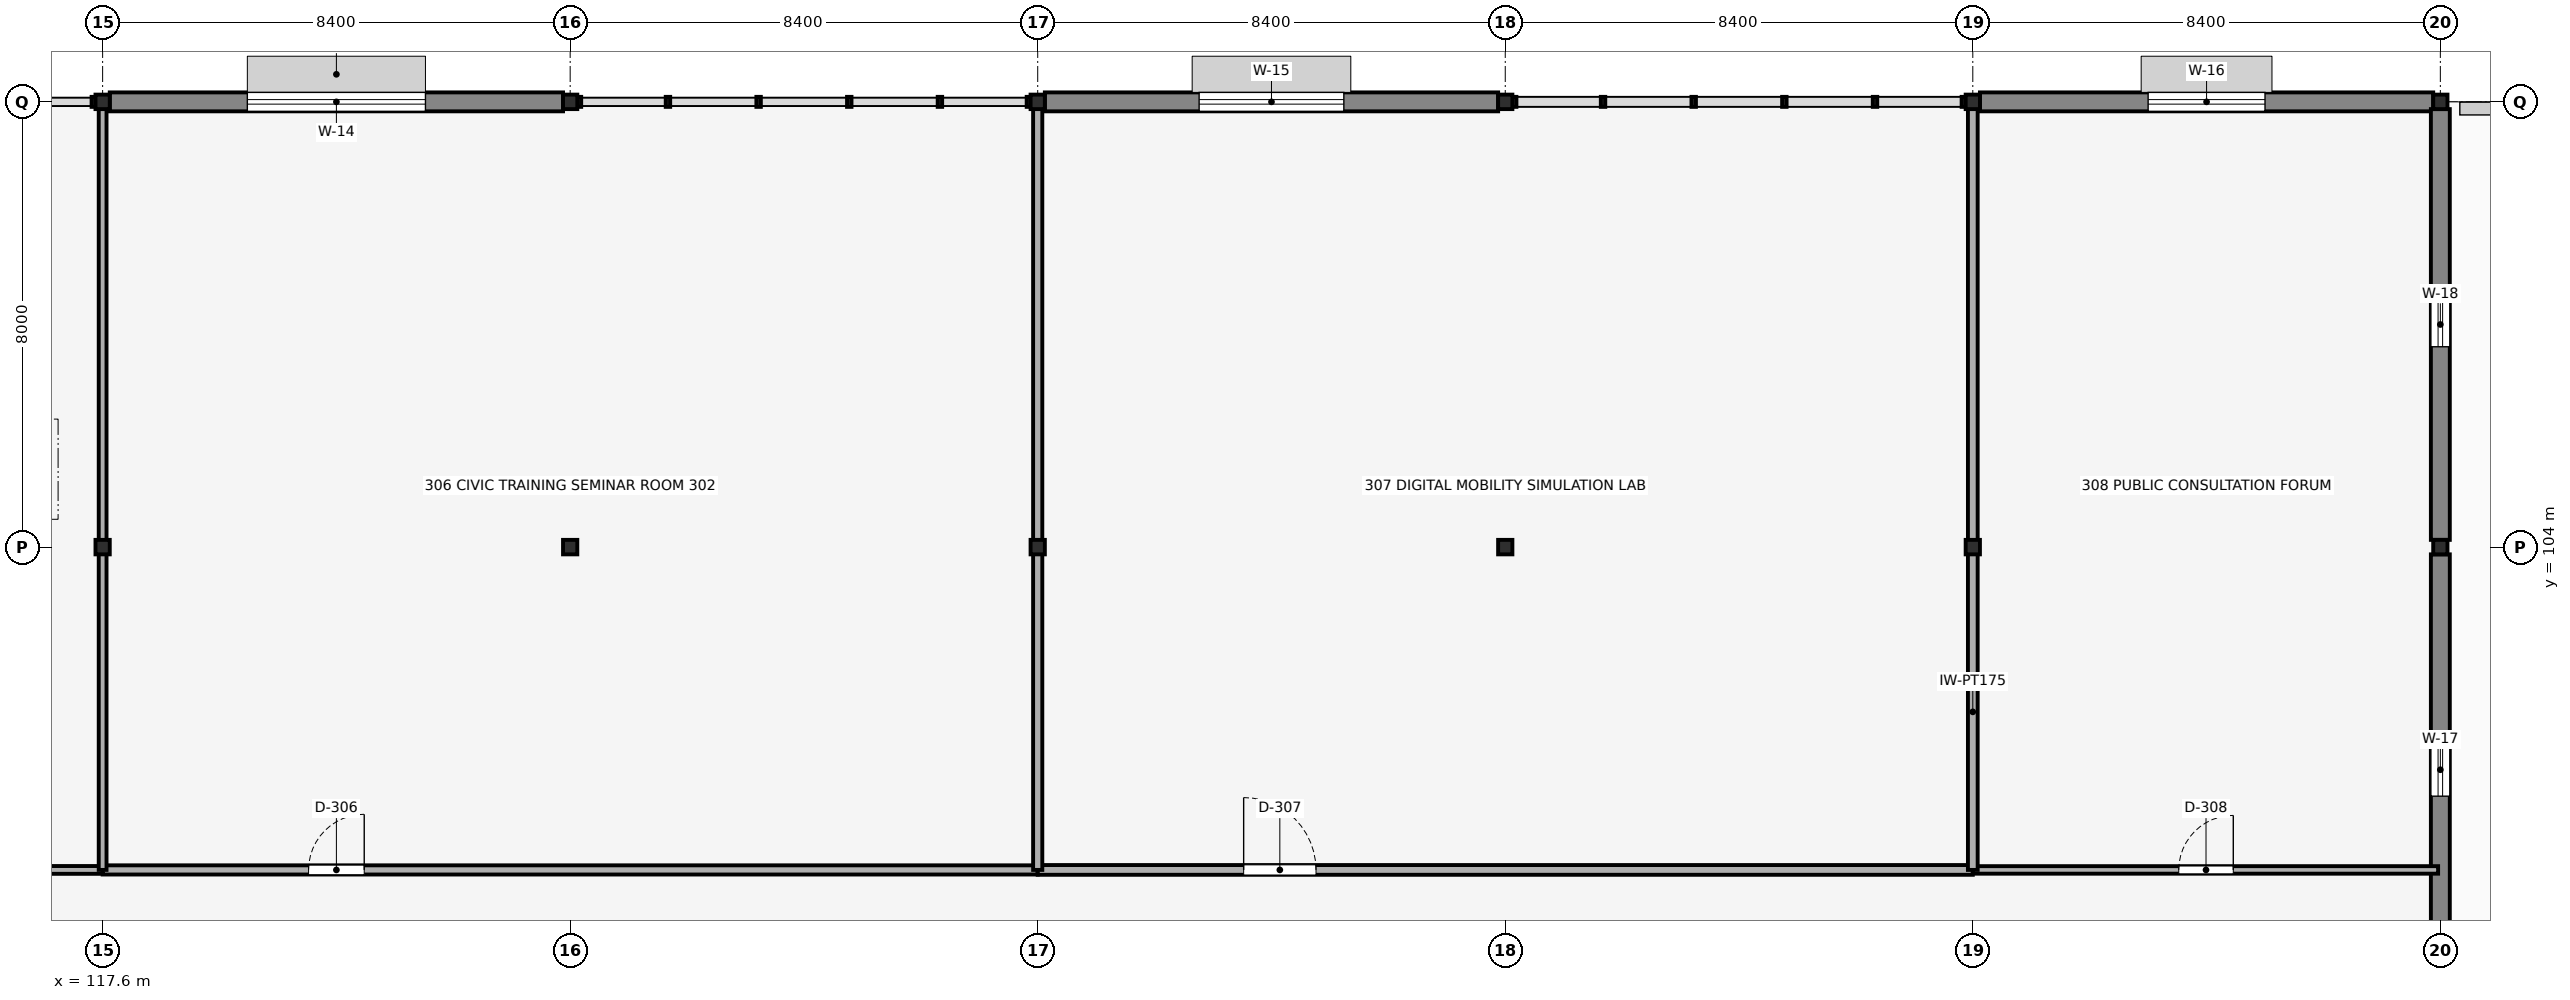
"""IFC4 building model, lengths in metres.
Left out: names, types, materials, properties, quantities, classifications, styles, units other than length and angle.
Written with IfcOpenShell. Run it as: python <this file> out.ifc"""

import sys

from ifc_helpers import new_model, si_unit, direction, frame, frame_2d, origin, origin_2d, place, context, subcontext, project, spatial, rectangle, i_section, extrude, element, fill, save


model = new_model("IFC4")
c1 = context("Model", 3, precision=1e-05, world=origin(), true_north=direction((0.0, 1.0)))
c2 = subcontext(c1, "Body", "Model", "MODEL_VIEW")
j1 = project(units=[si_unit("LENGTHUNIT", "METRE"), si_unit("PLANEANGLEUNIT", "RADIAN")], contexts=[c1])
p1 = place(None, origin())
s1 = spatial("IfcSite", under=j1, at=p1, CompositionType="ELEMENT")
p2 = place(p1, origin())
s2 = spatial("IfcBuilding", under=s1, at=p2, CompositionType="ELEMENT")
p3 = place(p2, frame((0.0, 0.0, 13.36)))
s3 = spatial("IfcBuildingStorey", under=s2, at=p3, CompositionType="ELEMENT", Elevation=13.36)
for number, where, z_axis, x_axis in (
    (1, (117.6, 104.0, 0.0), (0.0, 0.0, 1.0), (1.0, 0.0, 0.0)),
    (2, (117.6, 112.0, 0.0), (0.0, 0.0, 1.0), (1.0, 0.0, 0.0)),
    (3, (126.0, 104.0, 0.0), (0.0, 0.0, 1.0), (1.0, 0.0, 0.0)),
    (4, (126.0, 112.0, 0.0), (0.0, 0.0, 1.0), (1.0, 0.0, 0.0)),
    (5, (134.4, 104.0, 0.0), (0.0, 0.0, 1.0), (1.0, 0.0, 0.0)),
    (6, (134.4, 112.0, 0.0), (0.0, 0.0, 1.0), (1.0, 0.0, 0.0)),
    (7, (142.8, 104.0, 0.0), (0.0, 0.0, 1.0), (1.0, 0.0, 0.0)),
    (8, (142.8, 112.0, 0.0), (0.0, 0.0, 1.0), (1.0, 0.0, 0.0)),
    (9, (151.2, 104.0, 0.0), (0.0, 0.0, 1.0), (1.0, 0.0, 0.0)),
    (10, (151.2, 112.0, 0.0), (0.0, 0.0, 1.0), (1.0, 0.0, 0.0)),
    (11, (159.6, 104.0, 0.0), (0.0, 0.0, 1.0), (1.0, 0.0, 0.0)),
    (12, (159.6, 112.0, 0.0), (0.0, 0.0, 1.0), (1.0, 0.0, 0.0)),
):
    element("IfcColumn", number, at=place(p3, frame(where, z_axis=z_axis, x_axis=x_axis)), inside=s3, PredefinedType="COLUMN", context=c2, shape_type="SweptSolid", body=[
        extrude(i_section(OverallWidth=0.256, OverallDepth=0.26, WebThickness=0.01, FlangeThickness=0.017, FilletRadius=0.013, at=origin_2d()), origin(), (0.0, 0.0, 1.0), 3.58),
    ])
p4 = place(p3, frame((117.728, 112.0, 0.0), z_axis=(0.0, 0.0, 1.0), x_axis=(1.0, 0.0, 0.0)))
e13 = element("IfcWall", 13, at=p4, inside=s3, PredefinedType="SOLIDWALL", context=c2, shape_type="SweptSolid", body=[
    extrude(rectangle(XDim=8.144, YDim=0.34, at=frame_2d((4.072, 0.0))), origin(), (0.0, 0.0, 1.0), 3.28),
])
p5 = place(p4, frame((2.472, 0.0, 1.55), z_axis=(0.0, 0.0, 1.0), x_axis=(1.0, 0.0, 0.0)))
e14 = element("IfcOpeningElement", 14, at=p5, cuts=e13, PredefinedType="OPENING", context=c2, shape_type="SweptSolid", body=[
    extrude(rectangle(XDim=3.2, YDim=0.9, at=frame_2d((1.6, 0.45))), frame((0.0, 0.18, 0.0), z_axis=(0.0, -1.0, 0.0), x_axis=(1.0, 0.0, 0.0)), (0.0, 0.0, 1.0), 0.36),
])
p6 = place(p3, frame((134.528, 112.0, 0.0), z_axis=(0.0, 0.0, 1.0), x_axis=(1.0, 0.0, 0.0)))
e15 = element("IfcWall", 15, at=p6, inside=s3, PredefinedType="SOLIDWALL", context=c2, shape_type="SweptSolid", body=[
    extrude(rectangle(XDim=8.144, YDim=0.34, at=frame_2d((4.072, 0.0))), origin(), (0.0, 0.0, 1.0), 3.28),
])
p7 = place(p6, frame((2.772, 0.0, 1.55), z_axis=(0.0, 0.0, 1.0), x_axis=(1.0, 0.0, 0.0)))
e16 = element("IfcOpeningElement", 16, at=p7, cuts=e15, PredefinedType="OPENING", context=c2, shape_type="SweptSolid", body=[
    extrude(rectangle(XDim=2.6, YDim=0.85, at=frame_2d((1.3, 0.425))), frame((0.0, 0.18, 0.0), z_axis=(0.0, -1.0, 0.0), x_axis=(1.0, 0.0, 0.0)), (0.0, 0.0, 1.0), 0.36),
])
p8 = place(p3, frame((151.328, 112.0, 0.0), z_axis=(0.0, 0.0, 1.0), x_axis=(1.0, 0.0, 0.0)))
e17 = element("IfcWall", 17, at=p8, inside=s3, PredefinedType="SOLIDWALL", context=c2, shape_type="SweptSolid", body=[
    extrude(rectangle(XDim=8.144, YDim=0.34, at=frame_2d((4.072, 0.0))), origin(), (0.0, 0.0, 1.0), 3.28),
])
p9 = place(p8, frame((3.022, 0.0, 1.55), z_axis=(0.0, 0.0, 1.0), x_axis=(1.0, 0.0, 0.0)))
e18 = element("IfcOpeningElement", 18, at=p9, cuts=e17, PredefinedType="OPENING", context=c2, shape_type="SweptSolid", body=[
    extrude(rectangle(XDim=2.1, YDim=0.8, at=frame_2d((1.05, 0.4))), frame((0.0, 0.18, 0.0), z_axis=(0.0, -1.0, 0.0), x_axis=(1.0, 0.0, 0.0)), (0.0, 0.0, 1.0), 0.36),
])
p10 = place(p3, frame((159.6, 96.13, 0.0), z_axis=(0.0, 0.0, 1.0), x_axis=(0.0, 1.0, 0.0)))
e19 = element("IfcWall", 19, at=p10, inside=s3, PredefinedType="SOLIDWALL", context=c2, shape_type="SweptSolid", body=[
    extrude(rectangle(XDim=7.74, YDim=0.34, at=frame_2d((3.87, 0.0))), origin(), (0.0, 0.0, 1.0), 3.28),
])
p11 = place(p10, frame((3.395, 0.0, 0.65), z_axis=(0.0, 0.0, 1.0), x_axis=(1.0, 0.0, 0.0)))
e20 = element("IfcOpeningElement", 20, at=p11, cuts=e19, PredefinedType="OPENING", context=c2, shape_type="SweptSolid", body=[
    extrude(rectangle(XDim=0.95, YDim=2.1, at=frame_2d((0.475, 1.05))), frame((0.0, 0.18, 0.0), z_axis=(0.0, -1.0, 0.0), x_axis=(1.0, 0.0, 0.0)), (0.0, 0.0, 1.0), 0.36),
])
p12 = place(p3, frame((159.6, 104.13, 0.0), z_axis=(0.0, 0.0, 1.0), x_axis=(0.0, 1.0, 0.0)))
e21 = element("IfcWall", 21, at=p12, inside=s3, PredefinedType="SOLIDWALL", context=c2, shape_type="SweptSolid", body=[
    extrude(rectangle(XDim=7.74, YDim=0.34, at=frame_2d((3.87, 0.0))), origin(), (0.0, 0.0, 1.0), 3.28),
])
p13 = place(p12, frame((3.47, 0.0, 0.65), z_axis=(0.0, 0.0, 1.0), x_axis=(1.0, 0.0, 0.0)))
e22 = element("IfcOpeningElement", 22, at=p13, cuts=e21, PredefinedType="OPENING", context=c2, shape_type="SweptSolid", body=[
    extrude(rectangle(XDim=0.8, YDim=1.85, at=frame_2d((0.4, 0.925))), frame((0.0, 0.18, 0.0), z_axis=(0.0, -1.0, 0.0), x_axis=(1.0, 0.0, 0.0)), (0.0, 0.0, 1.0), 0.36),
])
p14 = place(p3, frame((159.95, 111.88, 0.0), z_axis=(0.0, 0.0, 1.0), x_axis=(1.0, 0.0, 0.0)))
e23 = element("IfcWall", 23, at=p14, inside=s3, PredefinedType="PARAPET", context=c2, shape_type="SweptSolid", body=[
    extrude(rectangle(XDim=7.93, YDim=0.23, at=frame_2d((3.965, 0.0))), origin(), (0.0, 0.0, 1.0), 1.05),
])
p15 = place(p3, frame((100.84, 98.2, 0.0), z_axis=(0.0, 0.0, 1.0), x_axis=(1.0, 0.0, 0.0)))
e24 = element("IfcWall", 24, at=p15, inside=s3, PredefinedType="PARTITIONING", context=c2, shape_type="SweptSolid", body=[
    extrude(rectangle(XDim=16.76, YDim=0.14, at=frame_2d((8.38, 0.0))), origin(), (0.0, 0.0, 1.0), 3.58),
])
p16 = place(p15, frame((3.66, 0.0, 0.0), z_axis=(0.0, 0.0, 1.0), x_axis=(1.0, 0.0, 0.0)))
e25 = element("IfcOpeningElement", 25, at=p16, cuts=e24, PredefinedType="OPENING", context=c2, shape_type="SweptSolid", body=[
    extrude(rectangle(XDim=1.05, YDim=2.15, at=frame_2d((0.525, 1.075))), frame((0.0, 0.08, 0.0), z_axis=(0.0, -1.0, 0.0), x_axis=(1.0, 0.0, 0.0)), (0.0, 0.0, 1.0), 0.16),
])
p17 = place(p3, frame((117.6, 98.2, 0.0), z_axis=(0.0, 0.0, 1.0), x_axis=(1.0, 0.0, 0.0)))
e26 = element("IfcWall", 26, at=p17, inside=s3, PredefinedType="PARTITIONING", context=c2, shape_type="SweptSolid", body=[
    extrude(rectangle(XDim=16.8, YDim=0.165, at=frame_2d((8.4, 0.0))), origin(), (0.0, 0.0, 1.0), 3.58),
])
p18 = place(p17, frame((3.7, 0.0, 0.0), z_axis=(0.0, 0.0, 1.0), x_axis=(1.0, 0.0, 0.0)))
e27 = element("IfcOpeningElement", 27, at=p18, cuts=e26, PredefinedType="OPENING", context=c2, shape_type="SweptSolid", body=[
    extrude(rectangle(XDim=1.0, YDim=2.15, at=frame_2d((0.5, 1.075))), frame((0.0, 0.093, 0.0), z_axis=(0.0, -1.0, 0.0), x_axis=(1.0, 0.0, 0.0)), (0.0, 0.0, 1.0), 0.185),
])
p19 = place(p3, frame((134.4, 98.2, 0.0), z_axis=(0.0, 0.0, 1.0), x_axis=(1.0, 0.0, 0.0)))
e28 = element("IfcWall", 28, at=p19, inside=s3, PredefinedType="PARTITIONING", context=c2, shape_type="SweptSolid", body=[
    extrude(rectangle(XDim=16.8, YDim=0.175, at=frame_2d((8.4, 0.0))), origin(), (0.0, 0.0, 1.0), 3.126),
])
p20 = place(p19, frame((3.7, 0.0, 0.0), z_axis=(0.0, 0.0, 1.0), x_axis=(1.0, 0.0, 0.0)))
e29 = element("IfcOpeningElement", 29, at=p20, cuts=e28, PredefinedType="OPENING", context=c2, shape_type="SweptSolid", body=[
    extrude(rectangle(XDim=1.3, YDim=2.25, at=frame_2d((0.65, 1.125))), frame((0.0, 0.097, 0.0), z_axis=(0.0, -1.0, 0.0), x_axis=(1.0, 0.0, 0.0)), (0.0, 0.0, 1.0), 0.195),
])
p21 = place(p3, frame((151.2, 98.2, 0.0), z_axis=(0.0, 0.0, 1.0), x_axis=(1.0, 0.0, 0.0)))
e30 = element("IfcWall", 30, at=p21, inside=s3, PredefinedType="PARTITIONING", context=c2, shape_type="SweptSolid", body=[
    extrude(rectangle(XDim=8.36, YDim=0.135, at=frame_2d((4.18, 0.0))), origin(), (0.0, 0.0, 1.0), 3.58),
])
p22 = place(p21, frame((3.7, 0.0, 0.0), z_axis=(0.0, 0.0, 1.0), x_axis=(1.0, 0.0, 0.0)))
e31 = element("IfcOpeningElement", 31, at=p22, cuts=e30, PredefinedType="OPENING", context=c2, shape_type="SweptSolid", body=[
    extrude(rectangle(XDim=0.98, YDim=2.15, at=frame_2d((0.49, 1.075))), frame((0.0, 0.077, 0.0), z_axis=(0.0, -1.0, 0.0), x_axis=(1.0, 0.0, 0.0)), (0.0, 0.0, 1.0), 0.155),
])
p23 = place(p3, frame((117.6, 98.2, 0.0), z_axis=(0.0, 0.0, 1.0), x_axis=(0.0, 1.0, 0.0)))
e32 = element("IfcWall", 32, at=p23, inside=s3, PredefinedType="PARTITIONING", context=c2, shape_type="SweptSolid", body=[
    extrude(rectangle(XDim=5.68, YDim=0.14, at=frame_2d((2.84, 0.0))), origin(), (0.0, 0.0, 1.0), 3.126),
])
p24 = place(p3, frame((117.6, 104.12, 0.0), z_axis=(0.0, 0.0, 1.0), x_axis=(0.0, 1.0, 0.0)))
e33 = element("IfcWall", 33, at=p24, inside=s3, PredefinedType="PARTITIONING", context=c2, shape_type="SweptSolid", body=[
    extrude(rectangle(XDim=7.76, YDim=0.14, at=frame_2d((3.88, 0.0))), origin(), (0.0, 0.0, 1.0), 3.126),
])
p25 = place(p3, frame((134.4, 98.2, 0.0), z_axis=(0.0, 0.0, 1.0), x_axis=(0.0, 1.0, 0.0)))
e34 = element("IfcWall", 34, at=p25, inside=s3, PredefinedType="PARTITIONING", context=c2, shape_type="SweptSolid", body=[
    extrude(rectangle(XDim=5.68, YDim=0.165, at=frame_2d((2.84, 0.0))), origin(), (0.0, 0.0, 1.0), 3.126),
])
p26 = place(p3, frame((134.4, 104.12, 0.0), z_axis=(0.0, 0.0, 1.0), x_axis=(0.0, 1.0, 0.0)))
e35 = element("IfcWall", 35, at=p26, inside=s3, PredefinedType="PARTITIONING", context=c2, shape_type="SweptSolid", body=[
    extrude(rectangle(XDim=7.76, YDim=0.165, at=frame_2d((3.88, 0.0))), origin(), (0.0, 0.0, 1.0), 3.126),
])
p27 = place(p3, frame((151.2, 98.2, 0.0), z_axis=(0.0, 0.0, 1.0), x_axis=(0.0, 1.0, 0.0)))
e36 = element("IfcWall", 36, at=p27, inside=s3, PredefinedType="PARTITIONING", context=c2, shape_type="SweptSolid", body=[
    extrude(rectangle(XDim=5.68, YDim=0.175, at=frame_2d((2.84, 0.0))), origin(), (0.0, 0.0, 1.0), 3.126),
])
p28 = place(p3, frame((151.2, 104.12, 0.0), z_axis=(0.0, 0.0, 1.0), x_axis=(0.0, 1.0, 0.0)))
e37 = element("IfcWall", 37, at=p28, inside=s3, PredefinedType="PARTITIONING", context=c2, shape_type="SweptSolid", body=[
    extrude(rectangle(XDim=7.76, YDim=0.175, at=frame_2d((3.88, 0.0))), origin(), (0.0, 0.0, 1.0), 3.126),
])
p29 = place(p5, origin())
e38 = element("IfcWindow", 38, at=p29, inside=s3, PartitioningType="TRIPLE_PANEL_HORIZONTAL", PredefinedType="WINDOW", context=c2, shape_type="SweptSolid", body=[
    extrude(rectangle(XDim=3.2, YDim=0.9, at=frame_2d((1.6, 0.45))), frame((0.0, 0.03, 0.0), z_axis=(0.0, -1.0, 0.0), x_axis=(1.0, 0.0, 0.0)), (0.0, 0.0, 1.0), 0.06),
])
fill(e14, e38)
p30 = place(p7, origin())
e39 = element("IfcWindow", 39, at=p30, inside=s3, PartitioningType="DOUBLE_PANEL_HORIZONTAL", PredefinedType="WINDOW", context=c2, shape_type="SweptSolid", body=[
    extrude(rectangle(XDim=2.6, YDim=0.85, at=frame_2d((1.3, 0.425))), frame((0.0, 0.03, 0.0), z_axis=(0.0, -1.0, 0.0), x_axis=(1.0, 0.0, 0.0)), (0.0, 0.0, 1.0), 0.06),
])
fill(e16, e39)
p31 = place(p9, origin())
e40 = element("IfcWindow", 40, at=p31, inside=s3, PartitioningType="DOUBLE_PANEL_HORIZONTAL", PredefinedType="WINDOW", context=c2, shape_type="SweptSolid", body=[
    extrude(rectangle(XDim=2.1, YDim=0.8, at=frame_2d((1.05, 0.4))), frame((0.0, 0.03, 0.0), z_axis=(0.0, -1.0, 0.0), x_axis=(1.0, 0.0, 0.0)), (0.0, 0.0, 1.0), 0.06),
])
fill(e18, e40)
p32 = place(p11, origin())
e41 = element("IfcWindow", 41, at=p32, inside=s3, PartitioningType="SINGLE_PANEL", PredefinedType="WINDOW", context=c2, shape_type="SweptSolid", body=[
    extrude(rectangle(XDim=0.95, YDim=2.1, at=frame_2d((0.475, 1.05))), frame((0.0, 0.03, 0.0), z_axis=(0.0, -1.0, 0.0), x_axis=(1.0, 0.0, 0.0)), (0.0, 0.0, 1.0), 0.06),
])
fill(e20, e41)
p33 = place(p13, origin())
e42 = element("IfcWindow", 42, at=p33, inside=s3, PartitioningType="SINGLE_PANEL", PredefinedType="WINDOW", context=c2, shape_type="SweptSolid", body=[
    extrude(rectangle(XDim=0.8, YDim=1.85, at=frame_2d((0.4, 0.925))), frame((0.0, 0.03, 0.0), z_axis=(0.0, -1.0, 0.0), x_axis=(1.0, 0.0, 0.0)), (0.0, 0.0, 1.0), 0.06),
])
fill(e22, e42)
p34 = place(p18, origin())
e43 = element("IfcDoor", 43, at=p34, inside=s3, OperationType="SINGLE_SWING_RIGHT", PredefinedType="DOOR", context=c2, shape_type="SweptSolid", body=[
    extrude(rectangle(XDim=1.0, YDim=2.15, at=frame_2d((0.5, 1.075))), frame((0.0, 0.025, 0.0), z_axis=(0.0, -1.0, 0.0), x_axis=(1.0, 0.0, 0.0)), (0.0, 0.0, 1.0), 0.05),
])
fill(e27, e43)
p35 = place(p20, origin())
e44 = element("IfcDoor", 44, at=p35, inside=s3, OperationType="SINGLE_SWING_LEFT", PredefinedType="DOOR", context=c2, shape_type="SweptSolid", body=[
    extrude(rectangle(XDim=1.3, YDim=2.25, at=frame_2d((0.65, 1.125))), frame((0.0, 0.025, 0.0), z_axis=(0.0, -1.0, 0.0), x_axis=(1.0, 0.0, 0.0)), (0.0, 0.0, 1.0), 0.05),
])
fill(e29, e44)
p36 = place(p22, origin())
e45 = element("IfcDoor", 45, at=p36, inside=s3, OperationType="SINGLE_SWING_RIGHT", PredefinedType="DOOR", context=c2, shape_type="SweptSolid", body=[
    extrude(rectangle(XDim=0.98, YDim=2.15, at=frame_2d((0.49, 1.075))), frame((0.0, 0.025, 0.0), z_axis=(0.0, -1.0, 0.0), x_axis=(1.0, 0.0, 0.0)), (0.0, 0.0, 1.0), 0.05),
])
fill(e31, e45)
save(model, sys.argv[1])
